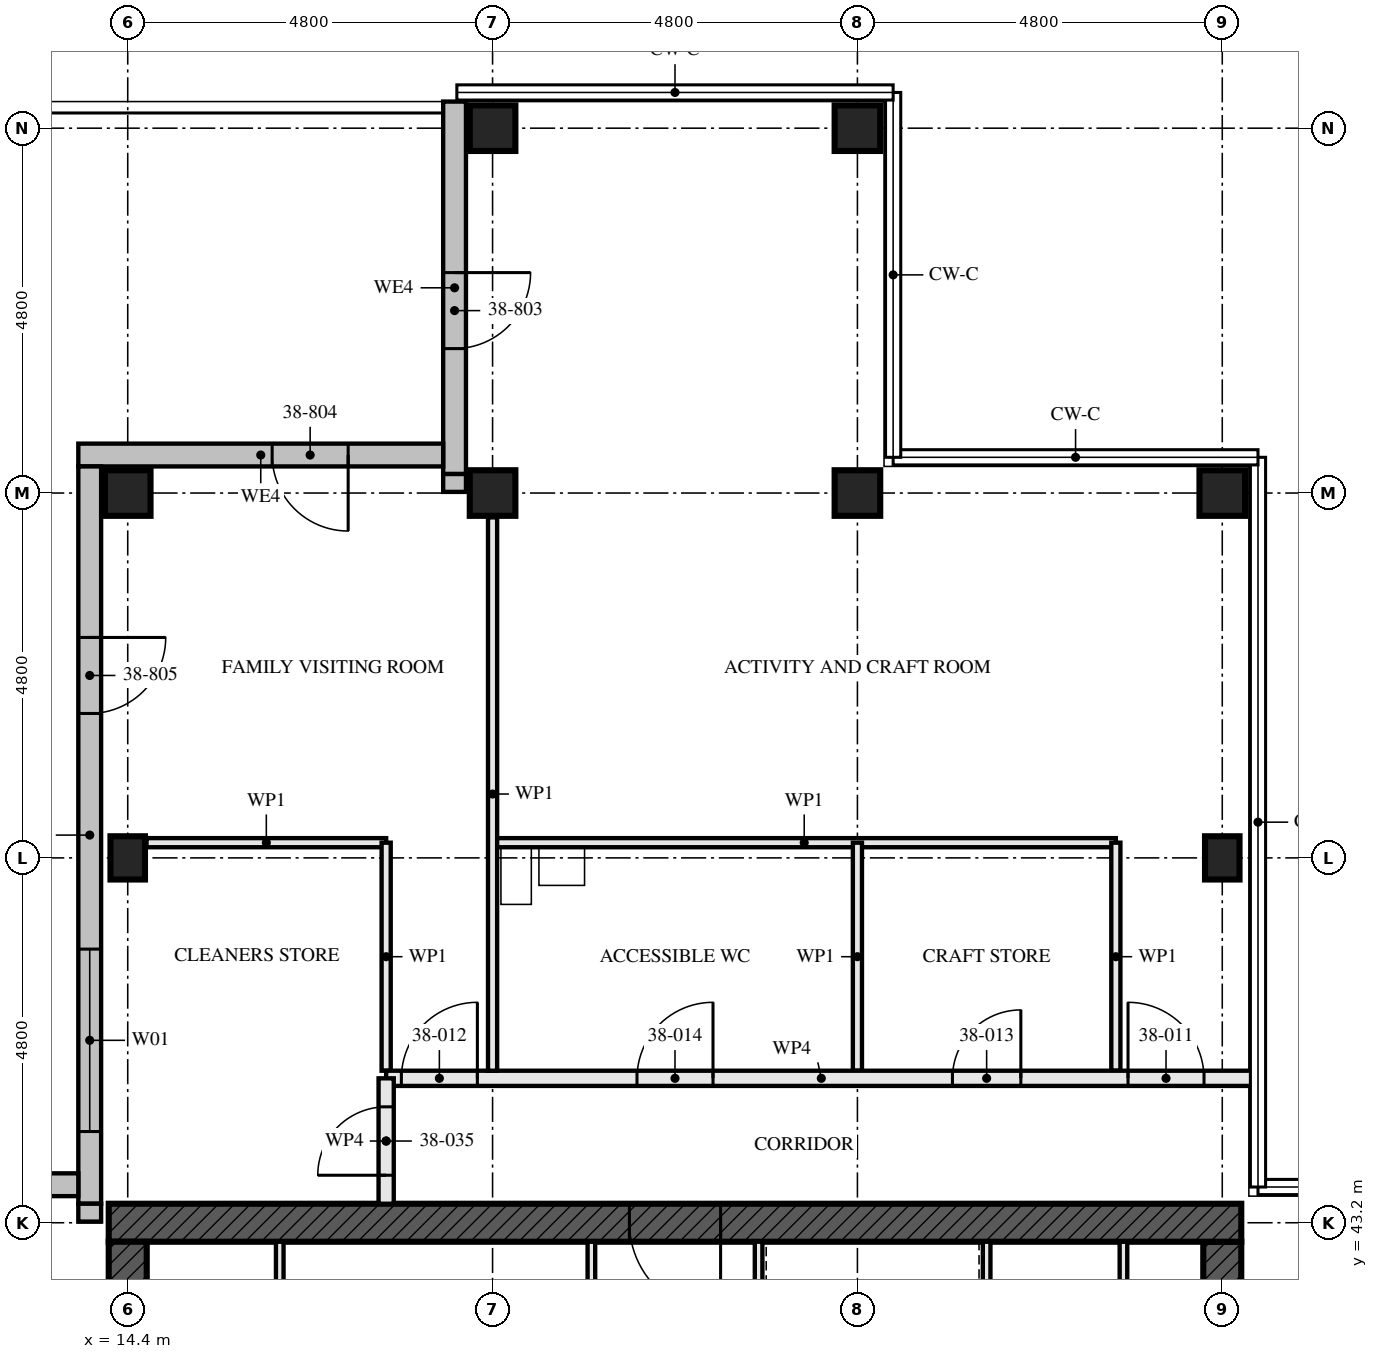
"""IFC4 building model, lengths in metres.
Left out: names, types, materials, properties, quantities, classifications, styles, units other than length and angle.
Written with IfcOpenShell. Run it as: python <this file> out.ifc"""

import sys

from ifc_helpers import new_model, si_unit, direction, frame, frame_2d, origin, origin_2d, place, context, subcontext, project, spatial, rectangle, hollow_rectangle, i_section, extrude, element, fill, save


model = new_model("IFC4")
c1 = context("Model", 3, precision=1e-05, world=origin(), true_north=direction((0.0, 1.0)))
c2 = subcontext(c1, "Body", "Model", "MODEL_VIEW")
j1 = project(units=[si_unit("LENGTHUNIT", "METRE"), si_unit("PLANEANGLEUNIT", "RADIAN")], contexts=[c1])
p1 = place(None, origin())
s1 = spatial("IfcSite", under=j1, at=p1, CompositionType="ELEMENT")
p2 = place(p1, origin())
s2 = spatial("IfcBuilding", under=s1, at=p2, CompositionType="ELEMENT")
p3 = place(p2, frame((0.0, 0.0, 141.0)))
s3 = spatial("IfcBuildingStorey", under=s2, at=p3, CompositionType="ELEMENT", Elevation=141.0)
p4 = place(p3, frame((14.4, 48.0, 0.0), z_axis=(0.0, 0.0, 1.0), x_axis=(1.0, 0.0, 0.0)))
e1 = element("IfcColumn", 1, at=p4, inside=s3, PredefinedType="COLUMN", context=c2, shape_type="SweptSolid", body=[
    extrude(i_section(OverallWidth=0.454, OverallDepth=0.569, WebThickness=0.078, FlangeThickness=0.125, FilletRadius=0.015, at=origin_2d()), origin(), (0.0, 0.0, 1.0), 3.5),
])
for number, where, z_axis, x_axis in (
    (2, (14.4, 52.8, 0.0), (0.0, 0.0, 1.0), (0.0, 1.0, 0.0)),
    (3, (19.2, 52.8, 0.0), (0.0, 0.0, 1.0), (0.0, 1.0, 0.0)),
    (4, (19.2, 57.6, 0.0), (0.0, 0.0, 1.0), (0.0, 1.0, 0.0)),
    (5, (24.0, 52.8, 0.0), (0.0, 0.0, 1.0), (0.0, 1.0, 0.0)),
    (6, (24.0, 57.6, 0.0), (0.0, 0.0, 1.0), (0.0, 1.0, 0.0)),
):
    element("IfcColumn", number, at=place(p3, frame(where, z_axis=z_axis, x_axis=x_axis)), inside=s3, PredefinedType="COLUMN", context=c2, shape_type="SweptSolid", body=[
        extrude(hollow_rectangle(XDim=0.6, YDim=0.6, WallThickness=0.05, at=origin_2d()), origin(), (0.0, 0.0, 1.0), 3.5),
    ])
p5 = place(p3, frame((28.8, 48.0, 0.0), z_axis=(0.0, 0.0, 1.0), x_axis=(1.0, 0.0, 0.0)))
e7 = element("IfcColumn", 7, at=p5, inside=s3, PredefinedType="COLUMN", context=c2, shape_type="SweptSolid", body=[
    extrude(i_section(OverallWidth=0.454, OverallDepth=0.569, WebThickness=0.078, FlangeThickness=0.125, FilletRadius=0.015, at=origin_2d()), origin(), (0.0, 0.0, 1.0), 3.5),
])
p6 = place(p3, frame((28.8, 52.8, 0.0), z_axis=(0.0, 0.0, 1.0), x_axis=(0.0, 1.0, 0.0)))
e8 = element("IfcColumn", 8, at=p6, inside=s3, PredefinedType="COLUMN", context=c2, shape_type="SweptSolid", body=[
    extrude(hollow_rectangle(XDim=0.6, YDim=0.6, WallThickness=0.05, at=origin_2d()), origin(), (0.0, 0.0, 1.0), 3.5),
])
p7 = place(p3, frame((29.05, 43.2, -0.17), z_axis=(0.0, 0.0, 1.0), x_axis=(-1.0, 0.0, 0.0)))
e9 = element("IfcWall", 9, at=p7, inside=s3, PredefinedType="SHEAR", context=c2, shape_type="SweptSolid", body=[
    extrude(rectangle(XDim=14.9, YDim=0.5, at=frame_2d((7.45, 0.0))), origin(), (0.0, 0.0, 1.0), 3.5),
])
p8 = place(p7, frame((6.85, 0.0, 0.17)))
e10 = element("IfcOpeningElement", 10, at=p8, cuts=e9, PredefinedType="OPENING", context=c2, shape_type="SweptSolid", body=[
    extrude(rectangle(XDim=1.2, YDim=2.1, at=frame_2d((0.6, 1.05))), frame((0.0, 0.26, 0.0), z_axis=(0.0, -1.0, 0.0), x_axis=(1.0, 0.0, 0.0)), (0.0, 0.0, 1.0), 0.521),
])
p9 = place(p3, frame((14.4, 42.95, -0.17), z_axis=(0.0, 0.0, 1.0), x_axis=(0.0, -1.0, 0.0)))
e11 = element("IfcWall", 11, at=p9, inside=s3, PredefinedType="SHEAR", context=c2, shape_type="SweptSolid", body=[
    extrude(rectangle(XDim=13.9, YDim=0.5, at=frame_2d((6.95, 0.0))), origin(), (0.0, 0.0, 1.0), 3.5),
])
p10 = place(p9, frame((6.35, 0.0, 0.17)))
e12 = element("IfcOpeningElement", 12, at=p10, cuts=e11, PredefinedType="OPENING", context=c2, shape_type="SweptSolid", body=[
    extrude(rectangle(XDim=1.2, YDim=2.1, at=frame_2d((0.6, 1.05))), frame((0.0, 0.26, 0.0), z_axis=(0.0, -1.0, 0.0), x_axis=(1.0, 0.0, 0.0)), (0.0, 0.0, 1.0), 0.521),
])
p11 = place(p3, frame((28.8, 29.05, -0.17), z_axis=(0.0, 0.0, 1.0), x_axis=(0.0, 1.0, 0.0)))
e13 = element("IfcWall", 13, at=p11, inside=s3, PredefinedType="SHEAR", context=c2, shape_type="SweptSolid", body=[
    extrude(rectangle(XDim=13.9, YDim=0.5, at=frame_2d((6.95, 0.0))), origin(), (0.0, 0.0, 1.0), 3.5),
])
p12 = place(p11, frame((6.35, 0.0, 0.17)))
e14 = element("IfcOpeningElement", 14, at=p12, cuts=e13, PredefinedType="OPENING", context=c2, shape_type="SweptSolid", body=[
    extrude(rectangle(XDim=1.2, YDim=2.1, at=frame_2d((0.6, 1.05))), frame((0.0, 0.26, 0.0), z_axis=(0.0, -1.0, 0.0), x_axis=(1.0, 0.0, 0.0)), (0.0, 0.0, 1.0), 0.521),
])
p13 = place(p3, frame((18.7, 57.95, 0.0), z_axis=(0.0, 0.0, 1.0), x_axis=(0.0, -1.0, 0.0)))
e15 = element("IfcWall", 15, at=p13, inside=s3, PredefinedType="SOLIDWALL", context=c2, shape_type="SweptSolid", body=[
    extrude(rectangle(XDim=4.9, YDim=0.3, at=frame_2d((2.45, 0.0))), origin(), (0.0, 0.0, 1.0), 3.5),
])
p14 = place(p13, frame((2.25, 0.0, 0.0)))
e16 = element("IfcOpeningElement", 16, at=p14, cuts=e15, PredefinedType="OPENING", context=c2, shape_type="SweptSolid", body=[
    extrude(rectangle(XDim=1.0, YDim=2.4, at=frame_2d((0.5, 1.2))), frame((0.0, 0.161, 0.0), z_axis=(0.0, -1.0, 0.0), x_axis=(1.0, 0.0, 0.0)), (0.0, 0.0, 1.0), 0.321),
])
p15 = place(p3, frame((18.55, 53.3, 0.0), z_axis=(0.0, 0.0, 1.0), x_axis=(-1.0, 0.0, 0.0)))
e17 = element("IfcWall", 17, at=p15, inside=s3, PredefinedType="SOLIDWALL", context=c2, shape_type="SweptSolid", body=[
    extrude(rectangle(XDim=4.8, YDim=0.3, at=frame_2d((2.4, 0.0))), origin(), (0.0, 0.0, 1.0), 3.5),
])
p16 = place(p15, frame((1.25, 0.0, 0.0)))
e18 = element("IfcOpeningElement", 18, at=p16, cuts=e17, PredefinedType="OPENING", context=c2, shape_type="SweptSolid", body=[
    extrude(rectangle(XDim=1.0, YDim=2.4, at=frame_2d((0.5, 1.2))), frame((0.0, 0.161, 0.0), z_axis=(0.0, -1.0, 0.0), x_axis=(1.0, 0.0, 0.0)), (0.0, 0.0, 1.0), 0.321),
])
p17 = place(p3, frame((13.9, 53.15, 0.0), z_axis=(0.0, 0.0, 1.0), x_axis=(0.0, -1.0, 0.0)))
e19 = element("IfcWall", 19, at=p17, inside=s3, PredefinedType="SOLIDWALL", context=c2, shape_type="SweptSolid", body=[
    extrude(rectangle(XDim=9.7, YDim=0.3, at=frame_2d((4.85, 0.0))), origin(), (0.0, 0.0, 1.0), 3.5),
])
p18 = place(p17, frame((2.25, 0.0, 0.0)))
e20 = element("IfcOpeningElement", 20, at=p18, cuts=e19, PredefinedType="OPENING", context=c2, shape_type="SweptSolid", body=[
    extrude(rectangle(XDim=1.0, YDim=2.4, at=frame_2d((0.5, 1.2))), frame((0.0, 0.161, 0.0), z_axis=(0.0, -1.0, 0.0), x_axis=(1.0, 0.0, 0.0)), (0.0, 0.0, 1.0), 0.321),
])
p19 = place(p17, frame((6.35, 0.0, 0.6)))
e21 = element("IfcOpeningElement", 21, at=p19, cuts=e19, PredefinedType="OPENING", context=c2, shape_type="SweptSolid", body=[
    extrude(rectangle(XDim=2.4, YDim=1.8, at=frame_2d((1.2, 0.9))), frame((0.0, 0.161, 0.0), z_axis=(0.0, -1.0, 0.0), x_axis=(1.0, 0.0, 0.0)), (0.0, 0.0, 1.0), 0.321),
])
p20 = place(p3, frame((13.75, 43.7, 0.0), z_axis=(0.0, 0.0, 1.0), x_axis=(-1.0, 0.0, 0.0)))
e22 = element("IfcWall", 22, at=p20, inside=s3, PredefinedType="SOLIDWALL", context=c2, shape_type="SweptSolid", body=[
    extrude(rectangle(XDim=9.6, YDim=0.3, at=frame_2d((4.8, 0.0))), origin(), (0.0, 0.0, 1.0), 3.5),
])
p21 = place(p20, frame((5.35, 0.0, 0.6)))
e23 = element("IfcOpeningElement", 23, at=p21, cuts=e22, PredefinedType="OPENING", context=c2, shape_type="SweptSolid", body=[
    extrude(rectangle(XDim=2.4, YDim=1.8, at=frame_2d((1.2, 0.9))), frame((0.0, 0.161, 0.0), z_axis=(0.0, -1.0, 0.0), x_axis=(1.0, 0.0, 0.0)), (0.0, 0.0, 1.0), 0.321),
])
p22 = place(p20, frame((0.55, 0.0, 0.6)))
e24 = element("IfcOpeningElement", 24, at=p22, cuts=e22, PredefinedType="OPENING", context=c2, shape_type="SweptSolid", body=[
    extrude(rectangle(XDim=2.4, YDim=1.8, at=frame_2d((1.2, 0.9))), frame((0.0, 0.161, 0.0), z_axis=(0.0, -1.0, 0.0), x_axis=(1.0, 0.0, 0.0)), (0.0, 0.0, 1.0), 0.321),
])
p23 = place(p3, frame((18.7, 53.05, 2.39), z_axis=(0.0, 0.0, 1.0), x_axis=(0.0, -1.0, 0.0)))
e25 = element("IfcWall", 25, at=p23, inside=s3, PredefinedType="SOLIDWALL", context=c2, shape_type="SweptSolid", body=[
    extrude(rectangle(XDim=0.235, YDim=0.3, at=frame_2d((0.118, 0.0))), origin(), (0.0, 0.0, 1.0), 0.88),
])
p24 = place(p3, frame((13.9, 43.45, 2.39), z_axis=(0.0, 0.0, 1.0), x_axis=(0.0, -1.0, 0.0)))
e26 = element("IfcWall", 26, at=p24, inside=s3, PredefinedType="SOLIDWALL", context=c2, shape_type="SweptSolid", body=[
    extrude(rectangle(XDim=0.235, YDim=0.3, at=frame_2d((0.117, 0.0))), origin(), (0.0, 0.0, 1.0), 0.88),
])
p25 = place(p3, frame((27.4, 48.2, 0.0), z_axis=(0.0, 0.0, 1.0), x_axis=(0.0, -1.0, 0.0)))
e27 = element("IfcWall", 27, at=p25, inside=s3, PredefinedType="PARTITIONING", context=c2, shape_type="SweptSolid", body=[
    extrude(rectangle(XDim=3.0, YDim=0.12, at=frame_2d((1.5, 0.0))), origin(), (0.0, 0.0, 1.0), 2.55),
])
p26 = place(p3, frame((27.4, 48.2, 0.0), z_axis=(0.0, 0.0, 1.0), x_axis=(-1.0, 0.0, 0.0)))
e28 = element("IfcWall", 28, at=p26, inside=s3, PredefinedType="PARTITIONING", context=c2, shape_type="SweptSolid", body=[
    extrude(rectangle(XDim=8.2, YDim=0.12, at=frame_2d((4.1, 0.0))), origin(), (0.0, 0.0, 1.0), 3.33),
])
for number, where, z_axis, x_axis in (
    (29, (24.0, 48.2, 0.0), (0.0, 0.0, 1.0), (0.0, -1.0, 0.0)),
    (30, (17.8, 48.2, 0.0), (0.0, 0.0, 1.0), (0.0, -1.0, 0.0)),
):
    element("IfcWall", number, at=place(p3, frame(where, z_axis=z_axis, x_axis=x_axis)), inside=s3, PredefinedType="PARTITIONING", context=c2, shape_type="SweptSolid", body=[
        extrude(rectangle(XDim=3.0, YDim=0.12, at=frame_2d((1.5, 0.0))), origin(), (0.0, 0.0, 1.0), 2.55),
    ])
p27 = place(p3, frame((17.8, 48.2, 0.0), z_axis=(0.0, 0.0, 1.0), x_axis=(-1.0, 0.0, 0.0)))
e31 = element("IfcWall", 31, at=p27, inside=s3, PredefinedType="PARTITIONING", context=c2, shape_type="SweptSolid", body=[
    extrude(rectangle(XDim=3.153, YDim=0.12, at=frame_2d((1.577, 0.0))), origin(), (0.0, 0.0, 1.0), 3.33),
])
p28 = place(p3, frame((19.2, 52.48, 0.0), z_axis=(0.0, 0.0, 1.0), x_axis=(0.0, -1.0, 0.0)))
e32 = element("IfcWall", 32, at=p28, inside=s3, PredefinedType="PARTITIONING", context=c2, shape_type="SweptSolid", body=[
    extrude(rectangle(XDim=7.28, YDim=0.12, at=frame_2d((3.64, 0.0))), origin(), (0.0, 0.0, 1.0), 2.55),
])
p29 = place(p3, frame((29.25, 45.1, 0.0), z_axis=(0.0, 0.0, 1.0), x_axis=(-1.0, 0.0, 0.0)))
e33 = element("IfcWall", 33, at=p29, inside=s3, PredefinedType="PARTITIONING", context=c2, shape_type="SweptSolid", body=[
    extrude(rectangle(XDim=11.45, YDim=0.2, at=frame_2d((5.725, 0.0))), origin(), (0.0, 0.0, 1.0), 2.32),
])
p30 = place(p29, frame((0.69, 0.0, 0.0)))
e34 = element("IfcOpeningElement", 34, at=p30, cuts=e33, PredefinedType="OPENING", context=c2, shape_type="SweptSolid", body=[
    extrude(rectangle(XDim=1.0, YDim=2.0, at=frame_2d((0.5, 1.0))), frame((0.0, 0.111, 0.0), z_axis=(0.0, -1.0, 0.0), x_axis=(1.0, 0.0, 0.0)), (0.0, 0.0, 1.0), 0.221),
])
p31 = place(p29, frame((10.25, 0.0, 0.0)))
e35 = element("IfcOpeningElement", 35, at=p31, cuts=e33, PredefinedType="OPENING", context=c2, shape_type="SweptSolid", body=[
    extrude(rectangle(XDim=1.0, YDim=2.0, at=frame_2d((0.5, 1.0))), frame((0.0, 0.111, 0.0), z_axis=(0.0, -1.0, 0.0), x_axis=(1.0, 0.0, 0.0)), (0.0, 0.0, 1.0), 0.221),
])
p32 = place(p29, frame((3.1, 0.0, 0.0)))
e36 = element("IfcOpeningElement", 36, at=p32, cuts=e33, PredefinedType="OPENING", context=c2, shape_type="SweptSolid", body=[
    extrude(rectangle(XDim=0.9, YDim=2.1, at=frame_2d((0.45, 1.05))), frame((0.0, 0.111, 0.0), z_axis=(0.0, -1.0, 0.0), x_axis=(1.0, 0.0, 0.0)), (0.0, 0.0, 1.0), 0.221),
])
p33 = place(p29, frame((7.15, 0.0, 0.0)))
e37 = element("IfcOpeningElement", 37, at=p33, cuts=e33, PredefinedType="OPENING", context=c2, shape_type="SweptSolid", body=[
    extrude(rectangle(XDim=1.0, YDim=2.1, at=frame_2d((0.5, 1.05))), frame((0.0, 0.111, 0.0), z_axis=(0.0, -1.0, 0.0), x_axis=(1.0, 0.0, 0.0)), (0.0, 0.0, 1.0), 0.221),
])
for number, where, z_axis, x_axis in (
    (38, (16.4, 37.15, 0.0), (0.0, 0.0, 1.0), (0.0, 1.0, 0.0)),
    (39, (27.5, 37.15, 0.0), (0.0, 0.0, 1.0), (0.0, 1.0, 0.0)),
):
    element("IfcWall", number, at=place(p3, frame(where, z_axis=z_axis, x_axis=x_axis)), inside=s3, PredefinedType="SOLIDWALL", context=c2, shape_type="SweptSolid", body=[
        extrude(rectangle(XDim=5.8, YDim=0.1, at=frame_2d((2.9, 0.0))), origin(), (0.0, 0.0, 1.0), 3.33),
    ])
p34 = place(p3, frame((20.5, 37.15, 0.0), z_axis=(0.0, 0.0, 1.0), x_axis=(0.0, 1.0, 0.0)))
e40 = element("IfcWall", 40, at=p34, inside=s3, PredefinedType="SOLIDWALL", context=c2, shape_type="SweptSolid", body=[
    extrude(rectangle(XDim=5.8, YDim=0.1, at=frame_2d((2.9, 0.0))), origin(), (0.0, 0.0, 1.0), 3.33),
])
p35 = place(p34, frame((0.925, 0.0, 0.0)))
e41 = element("IfcOpeningElement", 41, at=p35, cuts=e40, PredefinedType="OPENING", context=c2, shape_type="SweptSolid", body=[
    extrude(rectangle(XDim=1.0, YDim=2.1, at=frame_2d((0.5, 1.05))), frame((0.0, 0.061, 0.0), z_axis=(0.0, -1.0, 0.0), x_axis=(1.0, 0.0, 0.0)), (0.0, 0.0, 1.0), 0.121),
])
p36 = place(p3, frame((22.7, 37.15, 0.0), z_axis=(0.0, 0.0, 1.0), x_axis=(0.0, 1.0, 0.0)))
e42 = element("IfcWall", 42, at=p36, inside=s3, PredefinedType="SOLIDWALL", context=c2, shape_type="SweptSolid", body=[
    extrude(rectangle(XDim=5.8, YDim=0.1, at=frame_2d((2.9, 0.0))), origin(), (0.0, 0.0, 1.0), 3.33),
])
p37 = place(p36, frame((0.925, 0.0, 0.0)))
e43 = element("IfcOpeningElement", 43, at=p37, cuts=e42, PredefinedType="OPENING", context=c2, shape_type="SweptSolid", body=[
    extrude(rectangle(XDim=1.0, YDim=2.1, at=frame_2d((0.5, 1.05))), frame((0.0, 0.061, 0.0), z_axis=(0.0, -1.0, 0.0), x_axis=(1.0, 0.0, 0.0)), (0.0, 0.0, 1.0), 0.121),
])
p38 = place(p36, frame((3.9, 0.0, 0.0)))
e44 = element("IfcOpeningElement", 44, at=p38, cuts=e42, PredefinedType="OPENING", context=c2, shape_type="SweptSolid", body=[
    extrude(rectangle(XDim=1.0, YDim=2.1, at=frame_2d((0.5, 1.05))), frame((0.0, 0.061, 0.0), z_axis=(0.0, -1.0, 0.0), x_axis=(1.0, 0.0, 0.0)), (0.0, 0.0, 1.0), 0.121),
])
p39 = place(p3, frame((25.7, 37.15, 0.0), z_axis=(0.0, 0.0, 1.0), x_axis=(0.0, 1.0, 0.0)))
e45 = element("IfcWall", 45, at=p39, inside=s3, PredefinedType="SOLIDWALL", context=c2, shape_type="SweptSolid", body=[
    extrude(rectangle(XDim=5.8, YDim=0.1, at=frame_2d((2.9, 0.0))), origin(), (0.0, 0.0, 1.0), 3.33),
])
p40 = place(p3, frame((17.8, 45.1, 0.0), z_axis=(0.0, 0.0, 1.0), x_axis=(0.0, -1.0, 0.0)))
e46 = element("IfcWall", 46, at=p40, inside=s3, PredefinedType="PARTITIONING", context=c2, shape_type="SweptSolid", body=[
    extrude(rectangle(XDim=1.65, YDim=0.2, at=frame_2d((0.825, 0.0))), origin(), (0.0, 0.0, 1.0), 3.33),
])
p41 = place(p40, frame((0.375, 0.0, 0.0)))
e47 = element("IfcOpeningElement", 47, at=p41, cuts=e46, PredefinedType="OPENING", context=c2, shape_type="SweptSolid", body=[
    extrude(rectangle(XDim=0.9, YDim=2.1, at=frame_2d((0.45, 1.05))), frame((0.0, 0.111, 0.0), z_axis=(0.0, -1.0, 0.0), x_axis=(1.0, 0.0, 0.0)), (0.0, 0.0, 1.0), 0.221),
])
p42 = place(p14, origin())
e48 = element("IfcDoor", 48, at=p42, inside=s3, OperationType="SINGLE_SWING_LEFT", PredefinedType="DOOR", context=c2, shape_type="SweptSolid", body=[
    extrude(rectangle(XDim=1.0, YDim=2.4, at=frame_2d((0.5, 1.2))), frame((0.0, 0.035, 0.0), z_axis=(0.0, -1.0, 0.0), x_axis=(1.0, 0.0, 0.0)), (0.0, 0.0, 1.0), 0.07),
])
fill(e16, e48)
p43 = place(p16, origin())
e49 = element("IfcDoor", 49, at=p43, inside=s3, OperationType="SINGLE_SWING_LEFT", PredefinedType="DOOR", context=c2, shape_type="SweptSolid", body=[
    extrude(rectangle(XDim=1.0, YDim=2.4, at=frame_2d((0.5, 1.2))), frame((0.0, 0.035, 0.0), z_axis=(0.0, -1.0, 0.0), x_axis=(1.0, 0.0, 0.0)), (0.0, 0.0, 1.0), 0.07),
])
fill(e18, e49)
p44 = place(p18, origin())
e50 = element("IfcDoor", 50, at=p44, inside=s3, OperationType="SINGLE_SWING_LEFT", PredefinedType="DOOR", context=c2, shape_type="SweptSolid", body=[
    extrude(rectangle(XDim=1.0, YDim=2.4, at=frame_2d((0.5, 1.2))), frame((0.0, 0.035, 0.0), z_axis=(0.0, -1.0, 0.0), x_axis=(1.0, 0.0, 0.0)), (0.0, 0.0, 1.0), 0.07),
])
fill(e20, e50)
p45 = place(p19, origin())
e51 = element("IfcWindow", 51, at=p45, inside=s3, PartitioningType="SINGLE_PANEL", PredefinedType="WINDOW", context=c2, shape_type="SweptSolid", body=[
    extrude(rectangle(XDim=2.4, YDim=1.8, at=frame_2d((1.2, 0.9))), frame((0.0, 0.03, 0.0), z_axis=(0.0, -1.0, 0.0), x_axis=(1.0, 0.0, 0.0)), (0.0, 0.0, 1.0), 0.06),
])
fill(e21, e51)
p46 = place(p30, frame((1.0, 0.0, 0.0), z_axis=(0.0, 0.0, 1.0), x_axis=(-1.0, 0.0, 0.0)))
e52 = element("IfcDoor", 52, at=p46, inside=s3, OperationType="SINGLE_SWING_RIGHT", PredefinedType="DOOR", context=c2, shape_type="SweptSolid", body=[
    extrude(rectangle(XDim=1.0, YDim=2.0, at=frame_2d((0.5, 1.0))), frame((0.0, 0.027, 0.0), z_axis=(0.0, -1.0, 0.0), x_axis=(1.0, 0.0, 0.0)), (0.0, 0.0, 1.0), 0.054),
])
fill(e34, e52)
p47 = place(p31, frame((1.0, 0.0, 0.0), z_axis=(0.0, 0.0, 1.0), x_axis=(-1.0, 0.0, 0.0)))
e53 = element("IfcDoor", 53, at=p47, inside=s3, OperationType="SINGLE_SWING_LEFT", PredefinedType="DOOR", context=c2, shape_type="SweptSolid", body=[
    extrude(rectangle(XDim=1.0, YDim=2.0, at=frame_2d((0.5, 1.0))), frame((0.0, 0.027, 0.0), z_axis=(0.0, -1.0, 0.0), x_axis=(1.0, 0.0, 0.0)), (0.0, 0.0, 1.0), 0.054),
])
fill(e35, e53)
p48 = place(p32, frame((0.9, 0.0, 0.0), z_axis=(0.0, 0.0, 1.0), x_axis=(-1.0, 0.0, 0.0)))
e54 = element("IfcDoor", 54, at=p48, inside=s3, OperationType="SINGLE_SWING_LEFT", PredefinedType="DOOR", context=c2, shape_type="SweptSolid", body=[
    extrude(rectangle(XDim=0.9, YDim=2.1, at=frame_2d((0.45, 1.05))), frame((0.0, 0.027, 0.0), z_axis=(0.0, -1.0, 0.0), x_axis=(1.0, 0.0, 0.0)), (0.0, 0.0, 1.0), 0.054),
])
fill(e36, e54)
p49 = place(p33, frame((1.0, 0.0, 0.0), z_axis=(0.0, 0.0, 1.0), x_axis=(-1.0, 0.0, 0.0)))
e55 = element("IfcDoor", 55, at=p49, inside=s3, OperationType="SINGLE_SWING_LEFT", PredefinedType="DOOR", context=c2, shape_type="SweptSolid", body=[
    extrude(rectangle(XDim=1.0, YDim=2.1, at=frame_2d((0.5, 1.05))), frame((0.0, 0.027, 0.0), z_axis=(0.0, -1.0, 0.0), x_axis=(1.0, 0.0, 0.0)), (0.0, 0.0, 1.0), 0.054),
])
fill(e37, e55)
p50 = place(p41, frame((0.9, 0.0, 0.0), z_axis=(0.0, 0.0, 1.0), x_axis=(-1.0, 0.0, 0.0)))
e56 = element("IfcDoor", 56, at=p50, inside=s3, OperationType="SINGLE_SWING_RIGHT", PredefinedType="DOOR", context=c2, shape_type="SweptSolid", body=[
    extrude(rectangle(XDim=0.9, YDim=2.1, at=frame_2d((0.45, 1.05))), frame((0.0, 0.027, 0.0), z_axis=(0.0, -1.0, 0.0), x_axis=(1.0, 0.0, 0.0)), (0.0, 0.0, 1.0), 0.054),
])
fill(e47, e56)
p51 = place(p8, origin())
e57 = element("IfcDoor", 57, at=p51, inside=s3, OperationType="SINGLE_SWING_LEFT", PredefinedType="DOOR", context=c2, shape_type="SweptSolid", body=[
    extrude(rectangle(XDim=1.2, YDim=2.1, at=frame_2d((0.6, 1.05))), frame((0.0, 0.027, 0.0), z_axis=(0.0, -1.0, 0.0), x_axis=(1.0, 0.0, 0.0)), (0.0, 0.0, 1.0), 0.054),
])
fill(e10, e57)
save(model, sys.argv[1])
